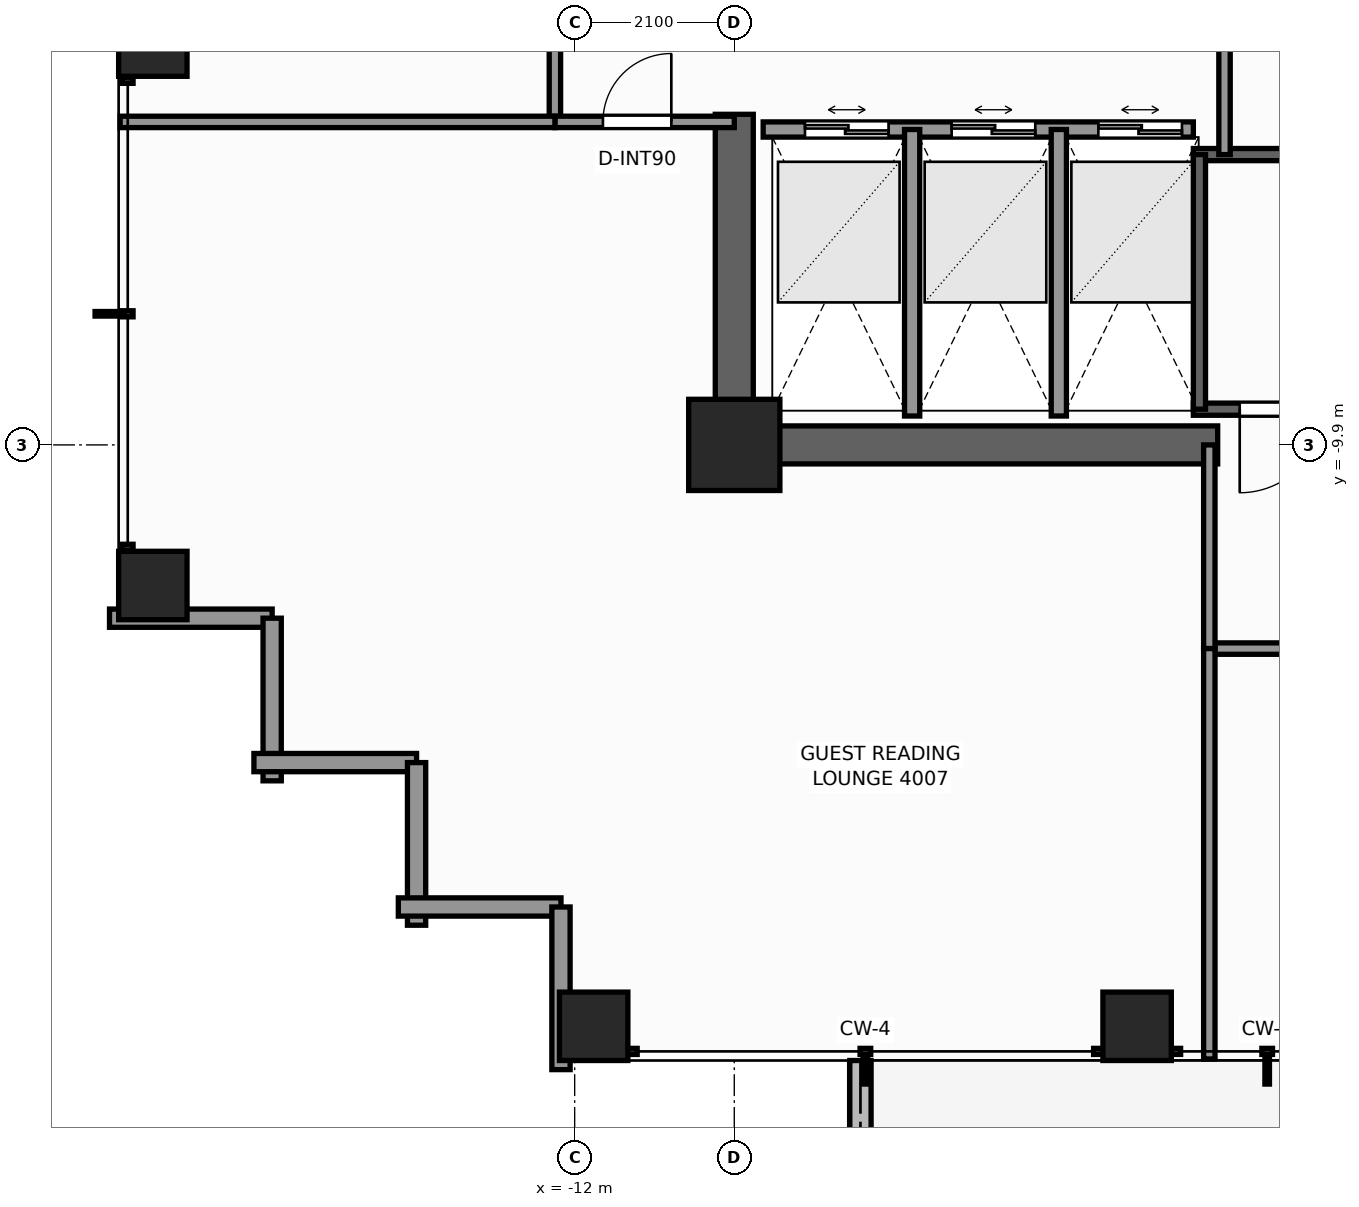
"""IFC4 building model, lengths in metres.
Left out: names, types, materials, properties, quantities, classifications, styles, units other than length and angle.
Written with IfcOpenShell. Run it as: python <this file> out.ifc"""

import sys

from ifc_helpers import new_model, si_unit, direction, frame, frame_2d, origin, origin_2d, place, context, subcontext, project, spatial, rectangle, extrude, element, fill, save


model = new_model("IFC4")
c1 = context("Model", 3, precision=1e-05, world=origin(), true_north=direction((0.0, 1.0)))
c2 = subcontext(c1, "Body", "Model", "MODEL_VIEW")
j1 = project(units=[si_unit("LENGTHUNIT", "METRE"), si_unit("PLANEANGLEUNIT", "RADIAN")], contexts=[c1])
p1 = place(None, origin())
s1 = spatial("IfcSite", under=j1, at=p1, CompositionType="ELEMENT")
p2 = place(p1, origin())
s2 = spatial("IfcBuilding", under=s1, at=p2, CompositionType="ELEMENT")
p3 = place(p2, frame((0.0, 0.0, 138.2)))
s3 = spatial("IfcBuildingStorey", under=s2, at=p3, CompositionType="ELEMENT", Elevation=138.2)
p4 = place(p3, frame((-3.54, -9.9, 0.0), z_axis=(0.0, 0.0, 1.0), x_axis=(-1.0, 0.0, 0.0)))
e1 = element("IfcWall", 1, at=p4, inside=s3, PredefinedType="SHEAR", context=c2, shape_type="SweptSolid", body=[
    extrude(rectangle(XDim=6.61, YDim=0.5, at=frame_2d((3.305, 0.0))), origin(), (0.0, 0.0, 1.0), 3.3),
])
p5 = place(p3, frame((-9.9, -9.65, 0.0), z_axis=(0.0, 0.0, 1.0), x_axis=(0.0, 1.0, 0.0)))
e2 = element("IfcWall", 2, at=p5, inside=s3, PredefinedType="SHEAR", context=c2, shape_type="SweptSolid", body=[
    extrude(rectangle(XDim=4.1, YDim=0.5, at=frame_2d((2.05, 0.0))), origin(), (0.0, 0.0, 1.0), 3.3),
])
p6 = place(p3, frame((-9.9, -9.9, 0.0), z_axis=(0.0, 0.0, 1.0), x_axis=(1.0, 0.0, 0.0)))
e3 = element("IfcColumn", 3, at=p6, inside=s3, PredefinedType="COLUMN", context=c2, shape_type="SweptSolid", body=[
    extrude(rectangle(XDim=1.2, YDim=1.2, at=origin_2d()), origin(), (0.0, 0.0, 1.0), 3.3),
])
for number, where, z_axis, x_axis in (
    (4, (-11.75, -17.55, 0.0), (0.0, 0.0, 1.0), (1.0, 0.0, 0.0)),
    (5, (-4.6, -17.55, 0.0), (0.0, 0.0, 1.0), (1.0, 0.0, 0.0)),
    (6, (-17.55, -11.75, 0.0), (0.0, 0.0, 1.0), (1.0, 0.0, 0.0)),
    (7, (-17.55, -4.6, 0.0), (0.0, 0.0, 1.0), (1.0, 0.0, 0.0)),
):
    element("IfcColumn", number, at=place(p3, frame(where, z_axis=z_axis, x_axis=x_axis)), inside=s3, PredefinedType="COLUMN", context=c2, shape_type="SweptSolid", body=[
        extrude(rectangle(XDim=0.9, YDim=0.9, at=origin_2d()), origin(), (0.0, 0.0, 1.0), 3.3),
    ])
p7 = place(p3, frame((-8.24, -18.0, -0.02), z_axis=(0.0, 0.0, 1.0), x_axis=(0.0, -1.0, 0.0)))
e8 = element("IfcWall", 8, at=p7, inside=s3, PredefinedType="PARAPET", context=c2, shape_type="SweptSolid", body=[
    extrude(rectangle(XDim=1.466, YDim=0.28, at=frame_2d((0.733, 0.0))), origin(), (0.0, 0.0, 1.0), 0.42),
])
for number, where, z_axis, x_axis in (
    (9, (-15.98, -12.18, 0.0), (0.0, 0.0, 1.0), (-1.0, 0.0, 0.0)),
    (10, (-15.98, -14.32, 0.0), (0.0, 0.0, 1.0), (0.0, 1.0, 0.0)),
):
    element("IfcWall", number, at=place(p3, frame(where, z_axis=z_axis, x_axis=x_axis)), inside=s3, PredefinedType="STANDARD", context=c2, shape_type="SweptSolid", body=[
        extrude(rectangle(XDim=2.14, YDim=0.24, at=frame_2d((1.07, 0.0))), origin(), (0.0, 0.0, 1.0), 2.479),
    ])
for number, where, z_axis, x_axis in (
    (11, (-14.08, -14.08, 0.0), (0.0, 0.0, 1.0), (-1.0, 0.0, 0.0)),
    (12, (-14.08, -16.22, 0.0), (0.0, 0.0, 1.0), (0.0, 1.0, 0.0)),
):
    element("IfcWall", number, at=place(p3, frame(where, z_axis=z_axis, x_axis=x_axis)), inside=s3, PredefinedType="STANDARD", context=c2, shape_type="SweptSolid", body=[
        extrude(rectangle(XDim=2.14, YDim=0.24, at=frame_2d((1.07, 0.0))), origin(), (0.0, 0.0, 1.0), 2.479),
    ])
for number, where, z_axis, x_axis in (
    (13, (-12.18, -15.98, 0.0), (0.0, 0.0, 1.0), (-1.0, 0.0, 0.0)),
    (14, (-12.18, -18.12, 0.0), (0.0, 0.0, 1.0), (0.0, 1.0, 0.0)),
):
    element("IfcWall", number, at=place(p3, frame(where, z_axis=z_axis, x_axis=x_axis)), inside=s3, PredefinedType="STANDARD", context=c2, shape_type="SweptSolid", body=[
        extrude(rectangle(XDim=2.14, YDim=0.24, at=frame_2d((1.07, 0.0))), origin(), (0.0, 0.0, 1.0), 2.479),
    ])
p8 = place(p3, frame((3.86, -9.43, 0.0), z_axis=(0.0, 0.0, 1.0), x_axis=(-1.0, 0.0, 0.0)))
e15 = element("IfcWall", 15, at=p8, inside=s3, PredefinedType="SHEAR", context=c2, shape_type="SweptSolid", body=[
    extrude(rectangle(XDim=7.72, YDim=0.16, at=frame_2d((3.86, 0.0))), origin(), (0.0, 0.0, 1.0), 3.3),
])
p9 = place(p8, frame((6.01, 0.0, 0.0)))
e16 = element("IfcOpeningElement", 16, at=p9, cuts=e15, PredefinedType="OPENING", context=c2, shape_type="SweptSolid", body=[
    extrude(rectangle(XDim=1.1, YDim=2.2, at=frame_2d((0.55, 1.1))), frame((0.0, 0.09, 0.0), z_axis=(0.0, -1.0, 0.0), x_axis=(1.0, 0.0, 0.0)), (0.0, 0.0, 1.0), 0.18),
])
p10 = place(p3, frame((-3.86, -6.08, 0.0), z_axis=(0.0, 0.0, 1.0), x_axis=(1.0, 0.0, 0.0)))
e17 = element("IfcWall", 17, at=p10, inside=s3, PredefinedType="SHEAR", context=c2, shape_type="SweptSolid", body=[
    extrude(rectangle(XDim=7.72, YDim=0.16, at=frame_2d((3.86, 0.0))), origin(), (0.0, 0.0, 1.0), 3.3),
])
p11 = place(p3, frame((-3.78, -9.43, 0.0), z_axis=(0.0, 0.0, 1.0), x_axis=(0.0, 1.0, 0.0)))
e18 = element("IfcWall", 18, at=p11, inside=s3, PredefinedType="SHEAR", context=c2, shape_type="SweptSolid", body=[
    extrude(rectangle(XDim=3.35, YDim=0.16, at=frame_2d((1.675, 0.0))), origin(), (0.0, 0.0, 1.0), 3.3),
])
p12 = place(p3, frame((-9.52, -5.75, 0.0), z_axis=(0.0, 0.0, 1.0), x_axis=(1.0, 0.0, 0.0)))
e19 = element("IfcWall", 19, at=p12, inside=s3, PredefinedType="SOLIDWALL", context=c2, shape_type="SweptSolid", body=[
    extrude(rectangle(XDim=5.66, YDim=0.2, at=frame_2d((2.83, 0.0))), origin(), (0.0, 0.0, 1.0), 3.1),
])
p13 = place(p12, frame((0.55, 0.0, 0.0)))
e20 = element("IfcOpeningElement", 20, at=p13, cuts=e19, PredefinedType="OPENING", context=c2, shape_type="SweptSolid", body=[
    extrude(rectangle(XDim=1.1, YDim=2.2, at=frame_2d((0.55, 1.1))), frame((0.0, 0.11, 0.0), z_axis=(0.0, -1.0, 0.0), x_axis=(1.0, 0.0, 0.0)), (0.0, 0.0, 1.0), 0.22),
])
p14 = place(p12, frame((2.48, 0.0, 0.0)))
e21 = element("IfcOpeningElement", 21, at=p14, cuts=e19, PredefinedType="OPENING", context=c2, shape_type="SweptSolid", body=[
    extrude(rectangle(XDim=1.1, YDim=2.2, at=frame_2d((0.55, 1.1))), frame((0.0, 0.11, 0.0), z_axis=(0.0, -1.0, 0.0), x_axis=(1.0, 0.0, 0.0)), (0.0, 0.0, 1.0), 0.22),
])
p15 = place(p12, frame((4.41, 0.0, 0.0)))
e22 = element("IfcOpeningElement", 22, at=p15, cuts=e19, PredefinedType="OPENING", context=c2, shape_type="SweptSolid", body=[
    extrude(rectangle(XDim=1.1, YDim=2.2, at=frame_2d((0.55, 1.1))), frame((0.0, 0.11, 0.0), z_axis=(0.0, -1.0, 0.0), x_axis=(1.0, 0.0, 0.0)), (0.0, 0.0, 1.0), 0.22),
])
for number, where, z_axis, x_axis in (
    (23, (-7.56, -9.52, 0.0), (0.0, 0.0, 1.0), (0.0, 1.0, 0.0)),
    (24, (-5.63, -9.52, 0.0), (0.0, 0.0, 1.0), (0.0, 1.0, 0.0)),
):
    element("IfcWall", number, at=place(p3, frame(where, z_axis=z_axis, x_axis=x_axis)), inside=s3, PredefinedType="SOLIDWALL", context=c2, shape_type="SweptSolid", body=[
        extrude(rectangle(XDim=3.77, YDim=0.2, at=frame_2d((1.885, 0.0))), origin(), (0.0, 0.0, 1.0), 3.1),
    ])
p16 = place(p3, frame((-3.45, -6.08, 0.0), z_axis=(0.0, 0.0, 1.0), x_axis=(0.0, 1.0, 0.0)))
e25 = element("IfcWall", 25, at=p16, inside=s3, PredefinedType="PARTITIONING", context=c2, shape_type="SweptSolid", body=[
    extrude(rectangle(XDim=2.36, YDim=0.15, at=frame_2d((1.18, 0.0))), origin(), (0.0, 0.0, 1.0), 3.1),
])
p17 = place(p3, frame((-3.65, -12.58, 0.0), z_axis=(0.0, 0.0, 1.0), x_axis=(1.0, 0.0, 0.0)))
e26 = element("IfcWall", 26, at=p17, inside=s3, PredefinedType="PARTITIONING", context=c2, shape_type="SweptSolid", body=[
    extrude(rectangle(XDim=16.07, YDim=0.15, at=frame_2d((8.035, 0.0))), origin(), (0.0, 0.0, 1.0), 2.312),
])
p18 = place(p17, frame((10.735, 0.0, 0.0)))
e27 = element("IfcOpeningElement", 27, at=p18, cuts=e26, PredefinedType="OPENING", context=c2, shape_type="SweptSolid", body=[
    extrude(rectangle(XDim=0.9, YDim=2.06, at=frame_2d((0.45, 1.03))), frame((0.0, 0.085, 0.0), z_axis=(0.0, -1.0, 0.0), x_axis=(1.0, 0.0, 0.0)), (0.0, 0.0, 1.0), 0.17),
])
p19 = place(p3, frame((-3.65, -12.58, 0.0), z_axis=(0.0, 0.0, 1.0), x_axis=(0.0, 1.0, 0.0)))
e28 = element("IfcWall", 28, at=p19, inside=s3, PredefinedType="PARTITIONING", context=c2, shape_type="SweptSolid", body=[
    extrude(rectangle(XDim=2.68, YDim=0.15, at=frame_2d((1.34, 0.0))), origin(), (0.0, 0.0, 1.0), 3.1),
])
p20 = place(p3, frame((-12.26, -5.65, 0.0), z_axis=(0.0, 0.0, 1.0), x_axis=(0.0, 1.0, 0.0)))
e29 = element("IfcWall", 29, at=p20, inside=s3, PredefinedType="PARTITIONING", context=c2, shape_type="SweptSolid", body=[
    extrude(rectangle(XDim=3.6, YDim=0.15, at=frame_2d((1.8, 0.0))), origin(), (0.0, 0.0, 1.0), 2.312),
])
p21 = place(p20, frame((2.156, 0.0, 0.0)))
e30 = element("IfcOpeningElement", 30, at=p21, cuts=e29, PredefinedType="OPENING", context=c2, shape_type="SweptSolid", body=[
    extrude(rectangle(XDim=0.9, YDim=2.06, at=frame_2d((0.45, 1.03))), frame((0.0, 0.085, 0.0), z_axis=(0.0, -1.0, 0.0), x_axis=(1.0, 0.0, 0.0)), (0.0, 0.0, 1.0), 0.17),
])
p22 = place(p3, frame((-12.26, -5.65, 0.0), z_axis=(0.0, 0.0, 1.0), x_axis=(1.0, 0.0, 0.0)))
e31 = element("IfcWall", 31, at=p22, inside=s3, PredefinedType="PARTITIONING", context=c2, shape_type="SweptSolid", body=[
    extrude(rectangle(XDim=2.36, YDim=0.15, at=frame_2d((1.18, 0.0))), origin(), (0.0, 0.0, 1.0), 3.1),
])
p23 = place(p22, frame((0.632, 0.0, 0.0)))
e32 = element("IfcOpeningElement", 32, at=p23, cuts=e31, PredefinedType="OPENING", context=c2, shape_type="SweptSolid", body=[
    extrude(rectangle(XDim=0.9, YDim=2.06, at=frame_2d((0.45, 1.03))), frame((0.0, 0.085, 0.0), z_axis=(0.0, -1.0, 0.0), x_axis=(1.0, 0.0, 0.0)), (0.0, 0.0, 1.0), 0.17),
])
p24 = place(p3, frame((-17.98, -5.65, 0.0), z_axis=(0.0, 0.0, 1.0), x_axis=(1.0, 0.0, 0.0)))
e33 = element("IfcWall", 33, at=p24, inside=s3, PredefinedType="PARTITIONING", context=c2, shape_type="SweptSolid", body=[
    extrude(rectangle(XDim=5.72, YDim=0.15, at=frame_2d((2.86, 0.0))), origin(), (0.0, 0.0, 1.0), 2.469),
])
p25 = place(p3, frame((-3.65, -17.98, 0.0), z_axis=(0.0, 0.0, 1.0), x_axis=(0.0, 1.0, 0.0)))
e34 = element("IfcWall", 34, at=p25, inside=s3, PredefinedType="PARTITIONING", context=c2, shape_type="SweptSolid", body=[
    extrude(rectangle(XDim=5.4, YDim=0.15, at=frame_2d((2.7, 0.0))), origin(), (0.0, 0.0, 1.0), 2.469),
])
p26 = place(p9, origin())
e35 = element("IfcDoor", 35, at=p26, inside=s3, OperationType="SINGLE_SWING_RIGHT", PredefinedType="DOOR", context=c2, shape_type="SweptSolid", body=[
    extrude(rectangle(XDim=1.1, YDim=2.2, at=frame_2d((0.55, 1.1))), frame((0.0, 0.025, 0.0), z_axis=(0.0, -1.0, 0.0), x_axis=(1.0, 0.0, 0.0)), (0.0, 0.0, 1.0), 0.05),
])
fill(e16, e35)
p27 = place(p13, origin())
e36 = element("IfcDoor", 36, at=p27, inside=s3, OperationType="DOUBLE_DOOR_SLIDING", PredefinedType="DOOR", context=c2, shape_type="SweptSolid", body=[
    extrude(rectangle(XDim=1.1, YDim=2.2, at=frame_2d((0.55, 1.1))), frame((0.0, 0.025, 0.0), z_axis=(0.0, -1.0, 0.0), x_axis=(1.0, 0.0, 0.0)), (0.0, 0.0, 1.0), 0.05),
])
fill(e20, e36)
p28 = place(p14, origin())
e37 = element("IfcDoor", 37, at=p28, inside=s3, OperationType="DOUBLE_DOOR_SLIDING", PredefinedType="DOOR", context=c2, shape_type="SweptSolid", body=[
    extrude(rectangle(XDim=1.1, YDim=2.2, at=frame_2d((0.55, 1.1))), frame((0.0, 0.025, 0.0), z_axis=(0.0, -1.0, 0.0), x_axis=(1.0, 0.0, 0.0)), (0.0, 0.0, 1.0), 0.05),
])
fill(e21, e37)
p29 = place(p15, origin())
e38 = element("IfcDoor", 38, at=p29, inside=s3, OperationType="DOUBLE_DOOR_SLIDING", PredefinedType="DOOR", context=c2, shape_type="SweptSolid", body=[
    extrude(rectangle(XDim=1.1, YDim=2.2, at=frame_2d((0.55, 1.1))), frame((0.0, 0.025, 0.0), z_axis=(0.0, -1.0, 0.0), x_axis=(1.0, 0.0, 0.0)), (0.0, 0.0, 1.0), 0.05),
])
fill(e22, e38)
p30 = place(p23, origin())
e39 = element("IfcDoor", 39, at=p30, inside=s3, OperationType="SINGLE_SWING_RIGHT", PredefinedType="DOOR", context=c2, shape_type="SweptSolid", body=[
    extrude(rectangle(XDim=0.9, YDim=2.06, at=frame_2d((0.45, 1.03))), frame((0.0, 0.025, 0.0), z_axis=(0.0, -1.0, 0.0), x_axis=(1.0, 0.0, 0.0)), (0.0, 0.0, 1.0), 0.05),
])
fill(e32, e39)
save(model, sys.argv[1])
